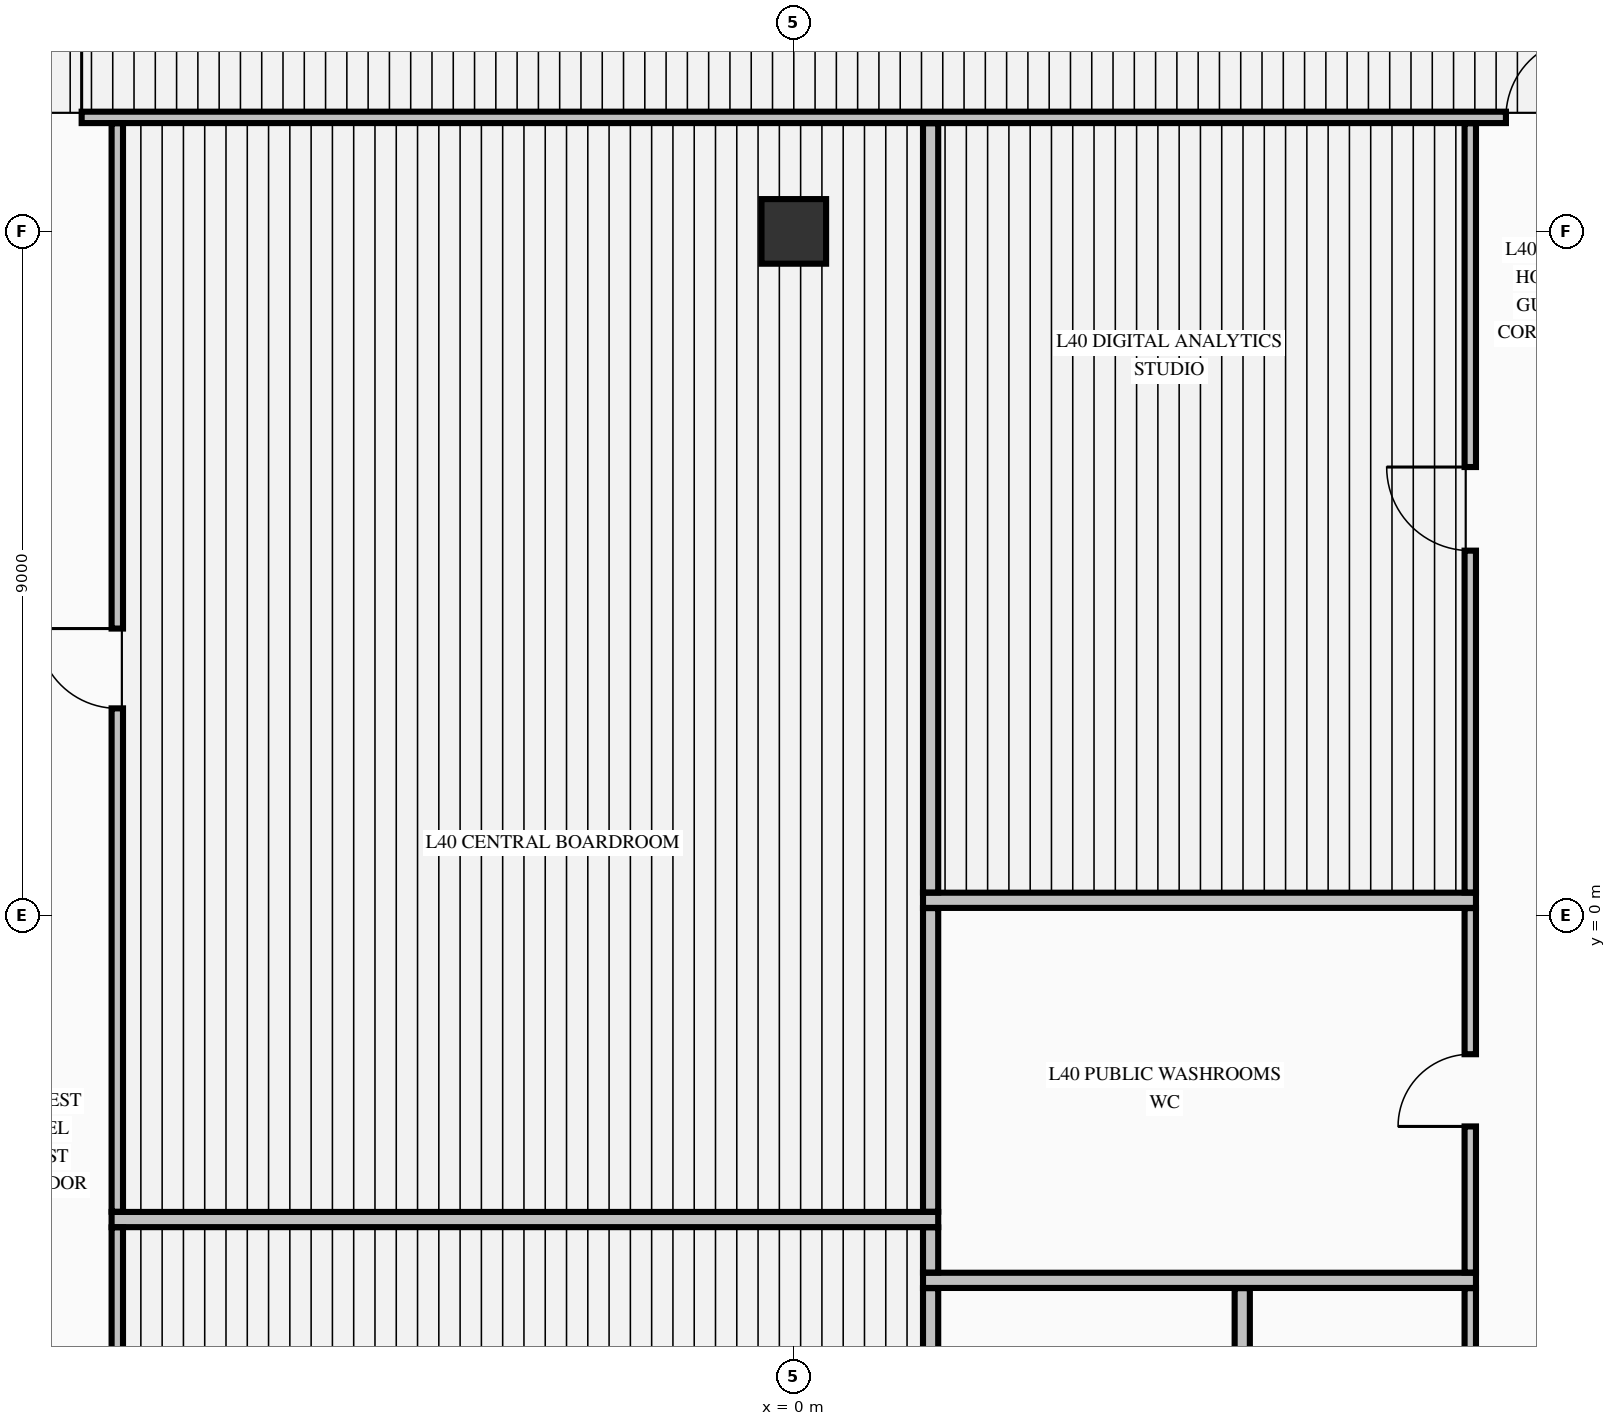
"""IFC4 building model, lengths in metres.
Left out: names, types, materials, properties, quantities, classifications, styles, units other than length and angle.
Written with IfcOpenShell. Run it as: python <this file> out.ifc"""

import sys

from ifc_helpers import new_model, si_unit, direction, frame, frame_2d, origin, origin_2d, place, context, subcontext, project, spatial, rectangle, extrude, element, fill, save


model = new_model("IFC4")
c1 = context("Model", 3, precision=1e-05, world=origin(), true_north=direction((0.0, 1.0)))
c2 = subcontext(c1, "Body", "Model", "MODEL_VIEW")
j1 = project(units=[si_unit("LENGTHUNIT", "METRE"), si_unit("PLANEANGLEUNIT", "RADIAN")], contexts=[c1])
p1 = place(None, origin())
s1 = spatial("IfcSite", under=j1, at=p1, CompositionType="ELEMENT")
p2 = place(p1, origin())
s2 = spatial("IfcBuilding", under=s1, at=p2, CompositionType="ELEMENT")
p3 = place(p2, frame((0.0, 0.0, 158.24)))
s3 = spatial("IfcBuildingStorey", under=s2, at=p3, CompositionType="ELEMENT", Elevation=158.24)
p4 = place(p3, frame((0.0, 9.0, -0.425), z_axis=(0.0, 0.0, 1.0), x_axis=(1.0, 0.0, 0.0)))
e1 = element("IfcColumn", 1, at=p4, inside=s3, PredefinedType="COLUMN", context=c2, shape_type="SweptSolid", body=[
    extrude(rectangle(XDim=0.85, YDim=0.85, at=origin_2d()), origin(), (0.0, 0.0, 1.0), 4.595),
])
p5 = place(p3, frame((1.7, -4.8, 0.0), z_axis=(0.0, 0.0, 1.0), x_axis=(1.0, 0.0, 0.0)))
e2 = element("IfcWall", 2, at=p5, inside=s3, PredefinedType="PARTITIONING", context=c2, shape_type="SweptSolid", body=[
    extrude(rectangle(XDim=7.275, YDim=0.2, at=frame_2d((3.638, 0.0))), origin(), (0.0, 0.0, 1.0), 4.17),
])
p6 = place(p3, frame((-8.975, -4.0, 0.0), z_axis=(0.0, 0.0, 1.0), x_axis=(1.0, 0.0, 0.0)))
e3 = element("IfcWall", 3, at=p6, inside=s3, PredefinedType="PARTITIONING", context=c2, shape_type="SweptSolid", body=[
    extrude(rectangle(XDim=10.875, YDim=0.2, at=frame_2d((5.438, 0.0))), origin(), (0.0, 0.0, 1.0), 4.17),
])
p7 = place(p3, frame((1.7, 0.2, 0.0), z_axis=(0.0, 0.0, 1.0), x_axis=(1.0, 0.0, 0.0)))
e4 = element("IfcWall", 4, at=p7, inside=s3, PredefinedType="PARTITIONING", context=c2, shape_type="SweptSolid", body=[
    extrude(rectangle(XDim=7.275, YDim=0.2, at=frame_2d((3.638, 0.0))), origin(), (0.0, 0.0, 1.0), 4.17),
])
p8 = place(p3, frame((-10.569, 10.5, 0.0), z_axis=(0.0, 0.0, 1.0), x_axis=(1.0, 0.0, 0.0)))
e5 = element("IfcWall", 5, at=p8, inside=s3, PredefinedType="PARTITIONING", context=c2, shape_type="SweptSolid", body=[
    extrude(rectangle(XDim=21.138, YDim=0.15, at=frame_2d((10.569, 0.0))), origin(), (0.0, 0.0, 1.0), 4.17),
])
p9 = place(p8, frame((0.15, 0.0, 0.0)))
e6 = element("IfcOpeningElement", 6, at=p9, cuts=e5, PredefinedType="OPENING", context=c2, shape_type="SweptSolid", body=[
    extrude(rectangle(XDim=1.05, YDim=2.15, at=frame_2d((0.525, 1.075))), frame((0.0, 0.085, 0.0), z_axis=(0.0, -1.0, 0.0), x_axis=(1.0, 0.0, 0.0)), (0.0, 0.0, 1.0), 0.17),
])
p10 = place(p8, frame((19.938, 0.0, 0.0)))
e7 = element("IfcOpeningElement", 7, at=p10, cuts=e5, PredefinedType="OPENING", context=c2, shape_type="SweptSolid", body=[
    extrude(rectangle(XDim=1.05, YDim=2.15, at=frame_2d((0.525, 1.075))), frame((0.0, 0.085, 0.0), z_axis=(0.0, -1.0, 0.0), x_axis=(1.0, 0.0, 0.0)), (0.0, 0.0, 1.0), 0.17),
])
p11 = place(p3, frame((-8.9, -9.872, 0.0), z_axis=(0.0, 0.0, 1.0), x_axis=(0.0, 1.0, 0.0)))
e8 = element("IfcWall", 8, at=p11, inside=s3, PredefinedType="PARTITIONING", context=c2, shape_type="SweptSolid", body=[
    extrude(rectangle(XDim=5.769, YDim=0.15, at=frame_2d((2.885, 0.0))), origin(), (0.0, 0.0, 1.0), 4.17),
])
p12 = place(p11, frame((2.427, 0.0, 0.0)))
e9 = element("IfcOpeningElement", 9, at=p12, cuts=e8, PredefinedType="OPENING", context=c2, shape_type="SweptSolid", body=[
    extrude(rectangle(XDim=0.95, YDim=2.15, at=frame_2d((0.475, 1.075))), frame((0.0, 0.085, 0.0), z_axis=(0.0, -1.0, 0.0), x_axis=(1.0, 0.0, 0.0)), (0.0, 0.0, 1.0), 0.17),
])
p13 = place(p3, frame((-8.9, -3.897, 0.0), z_axis=(0.0, 0.0, 1.0), x_axis=(0.0, 1.0, 0.0)))
e10 = element("IfcWall", 10, at=p13, inside=s3, PredefinedType="PARTITIONING", context=c2, shape_type="SweptSolid", body=[
    extrude(rectangle(XDim=14.319, YDim=0.15, at=frame_2d((7.16, 0.0))), origin(), (0.0, 0.0, 1.0), 4.17),
])
p14 = place(p13, frame((6.622, 0.0, 0.0)))
e11 = element("IfcOpeningElement", 11, at=p14, cuts=e10, PredefinedType="OPENING", context=c2, shape_type="SweptSolid", body=[
    extrude(rectangle(XDim=1.05, YDim=2.15, at=frame_2d((0.525, 1.075))), frame((0.0, 0.085, 0.0), z_axis=(0.0, -1.0, 0.0), x_axis=(1.0, 0.0, 0.0)), (0.0, 0.0, 1.0), 0.17),
])
p15 = place(p3, frame((1.8, -9.872, 0.0), z_axis=(0.0, 0.0, 1.0), x_axis=(0.0, 1.0, 0.0)))
e12 = element("IfcWall", 12, at=p15, inside=s3, PredefinedType="PARTITIONING", context=c2, shape_type="SweptSolid", body=[
    extrude(rectangle(XDim=4.969, YDim=0.2, at=frame_2d((2.484, 0.0))), origin(), (0.0, 0.0, 1.0), 4.17),
])
p16 = place(p3, frame((1.8, -4.697, 0.0), z_axis=(0.0, 0.0, 1.0), x_axis=(0.0, 1.0, 0.0)))
e13 = element("IfcWall", 13, at=p16, inside=s3, PredefinedType="PARTITIONING", context=c2, shape_type="SweptSolid", body=[
    extrude(rectangle(XDim=0.594, YDim=0.2, at=frame_2d((0.297, 0.0))), origin(), (0.0, 0.0, 1.0), 4.17),
])
p17 = place(p3, frame((1.8, -3.897, 0.0), z_axis=(0.0, 0.0, 1.0), x_axis=(0.0, 1.0, 0.0)))
e14 = element("IfcWall", 14, at=p17, inside=s3, PredefinedType="PARTITIONING", context=c2, shape_type="SweptSolid", body=[
    extrude(rectangle(XDim=3.994, YDim=0.2, at=frame_2d((1.997, 0.0))), origin(), (0.0, 0.0, 1.0), 4.17),
])
p18 = place(p3, frame((1.8, 0.303, 0.0), z_axis=(0.0, 0.0, 1.0), x_axis=(0.0, 1.0, 0.0)))
e15 = element("IfcWall", 15, at=p18, inside=s3, PredefinedType="PARTITIONING", context=c2, shape_type="SweptSolid", body=[
    extrude(rectangle(XDim=10.119, YDim=0.2, at=frame_2d((5.06, 0.0))), origin(), (0.0, 0.0, 1.0), 4.17),
])
p19 = place(p3, frame((5.9, -9.872, 0.0), z_axis=(0.0, 0.0, 1.0), x_axis=(0.0, 1.0, 0.0)))
e16 = element("IfcWall", 16, at=p19, inside=s3, PredefinedType="PARTITIONING", context=c2, shape_type="SweptSolid", body=[
    extrude(rectangle(XDim=4.969, YDim=0.2, at=frame_2d((2.484, 0.0))), origin(), (0.0, 0.0, 1.0), 4.17),
])
p20 = place(p3, frame((8.9, -9.872, 0.0), z_axis=(0.0, 0.0, 1.0), x_axis=(0.0, 1.0, 0.0)))
e17 = element("IfcWall", 17, at=p20, inside=s3, PredefinedType="PARTITIONING", context=c2, shape_type="SweptSolid", body=[
    extrude(rectangle(XDim=4.969, YDim=0.15, at=frame_2d((2.484, 0.0))), origin(), (0.0, 0.0, 1.0), 4.17),
])
p21 = place(p20, frame((1.997, 0.0, 0.0)))
e18 = element("IfcOpeningElement", 18, at=p21, cuts=e17, PredefinedType="OPENING", context=c2, shape_type="SweptSolid", body=[
    extrude(rectangle(XDim=0.95, YDim=2.15, at=frame_2d((0.475, 1.075))), frame((0.0, 0.085, 0.0), z_axis=(0.0, -1.0, 0.0), x_axis=(1.0, 0.0, 0.0)), (0.0, 0.0, 1.0), 0.17),
])
p22 = place(p3, frame((8.9, -4.697, 0.0), z_axis=(0.0, 0.0, 1.0), x_axis=(0.0, 1.0, 0.0)))
e19 = element("IfcWall", 19, at=p22, inside=s3, PredefinedType="PARTITIONING", context=c2, shape_type="SweptSolid", body=[
    extrude(rectangle(XDim=4.794, YDim=0.15, at=frame_2d((2.397, 0.0))), origin(), (0.0, 0.0, 1.0), 4.17),
])
p23 = place(p22, frame((1.922, 0.0, 0.0)))
e20 = element("IfcOpeningElement", 20, at=p23, cuts=e19, PredefinedType="OPENING", context=c2, shape_type="SweptSolid", body=[
    extrude(rectangle(XDim=0.95, YDim=2.15, at=frame_2d((0.475, 1.075))), frame((0.0, 0.085, 0.0), z_axis=(0.0, -1.0, 0.0), x_axis=(1.0, 0.0, 0.0)), (0.0, 0.0, 1.0), 0.17),
])
p24 = place(p3, frame((8.9, 0.303, 0.0), z_axis=(0.0, 0.0, 1.0), x_axis=(0.0, 1.0, 0.0)))
e21 = element("IfcWall", 21, at=p24, inside=s3, PredefinedType="PARTITIONING", context=c2, shape_type="SweptSolid", body=[
    extrude(rectangle(XDim=10.119, YDim=0.15, at=frame_2d((5.06, 0.0))), origin(), (0.0, 0.0, 1.0), 4.17),
])
p25 = place(p24, frame((4.497, 0.0, 0.0)))
e22 = element("IfcOpeningElement", 22, at=p25, cuts=e21, PredefinedType="OPENING", context=c2, shape_type="SweptSolid", body=[
    extrude(rectangle(XDim=1.1, YDim=2.15, at=frame_2d((0.55, 1.075))), frame((0.0, 0.085, 0.0), z_axis=(0.0, -1.0, 0.0), x_axis=(1.0, 0.0, 0.0)), (0.0, 0.0, 1.0), 0.17),
])
p26 = place(p9, origin())
e23 = element("IfcDoor", 23, at=p26, inside=s3, OperationType="SINGLE_SWING_RIGHT", PredefinedType="DOOR", context=c2, shape_type="SweptSolid", body=[
    extrude(rectangle(XDim=1.05, YDim=2.15, at=frame_2d((0.525, 1.075))), frame((0.0, 0.025, 0.0), z_axis=(0.0, -1.0, 0.0), x_axis=(1.0, 0.0, 0.0)), (0.0, 0.0, 1.0), 0.05),
])
fill(e6, e23)
p27 = place(p10, origin())
e24 = element("IfcDoor", 24, at=p27, inside=s3, OperationType="SINGLE_SWING_RIGHT", PredefinedType="DOOR", context=c2, shape_type="SweptSolid", body=[
    extrude(rectangle(XDim=1.05, YDim=2.15, at=frame_2d((0.525, 1.075))), frame((0.0, 0.025, 0.0), z_axis=(0.0, -1.0, 0.0), x_axis=(1.0, 0.0, 0.0)), (0.0, 0.0, 1.0), 0.05),
])
fill(e7, e24)
p28 = place(p14, origin())
e25 = element("IfcDoor", 25, at=p28, inside=s3, OperationType="SINGLE_SWING_RIGHT", PredefinedType="DOOR", context=c2, shape_type="SweptSolid", body=[
    extrude(rectangle(XDim=1.05, YDim=2.15, at=frame_2d((0.525, 1.075))), frame((0.0, 0.025, 0.0), z_axis=(0.0, -1.0, 0.0), x_axis=(1.0, 0.0, 0.0)), (0.0, 0.0, 1.0), 0.05),
])
fill(e11, e25)
p29 = place(p25, origin())
e26 = element("IfcDoor", 26, at=p29, inside=s3, OperationType="SINGLE_SWING_RIGHT", PredefinedType="DOOR", context=c2, shape_type="SweptSolid", body=[
    extrude(rectangle(XDim=1.1, YDim=2.15, at=frame_2d((0.55, 1.075))), frame((0.0, 0.025, 0.0), z_axis=(0.0, -1.0, 0.0), x_axis=(1.0, 0.0, 0.0)), (0.0, 0.0, 1.0), 0.05),
])
fill(e22, e26)
p30 = place(p23, origin())
e27 = element("IfcDoor", 27, at=p30, inside=s3, OperationType="SINGLE_SWING_LEFT", PredefinedType="DOOR", context=c2, shape_type="SweptSolid", body=[
    extrude(rectangle(XDim=0.95, YDim=2.15, at=frame_2d((0.475, 1.075))), frame((0.0, 0.025, 0.0), z_axis=(0.0, -1.0, 0.0), x_axis=(1.0, 0.0, 0.0)), (0.0, 0.0, 1.0), 0.05),
])
fill(e20, e27)
save(model, sys.argv[1])
